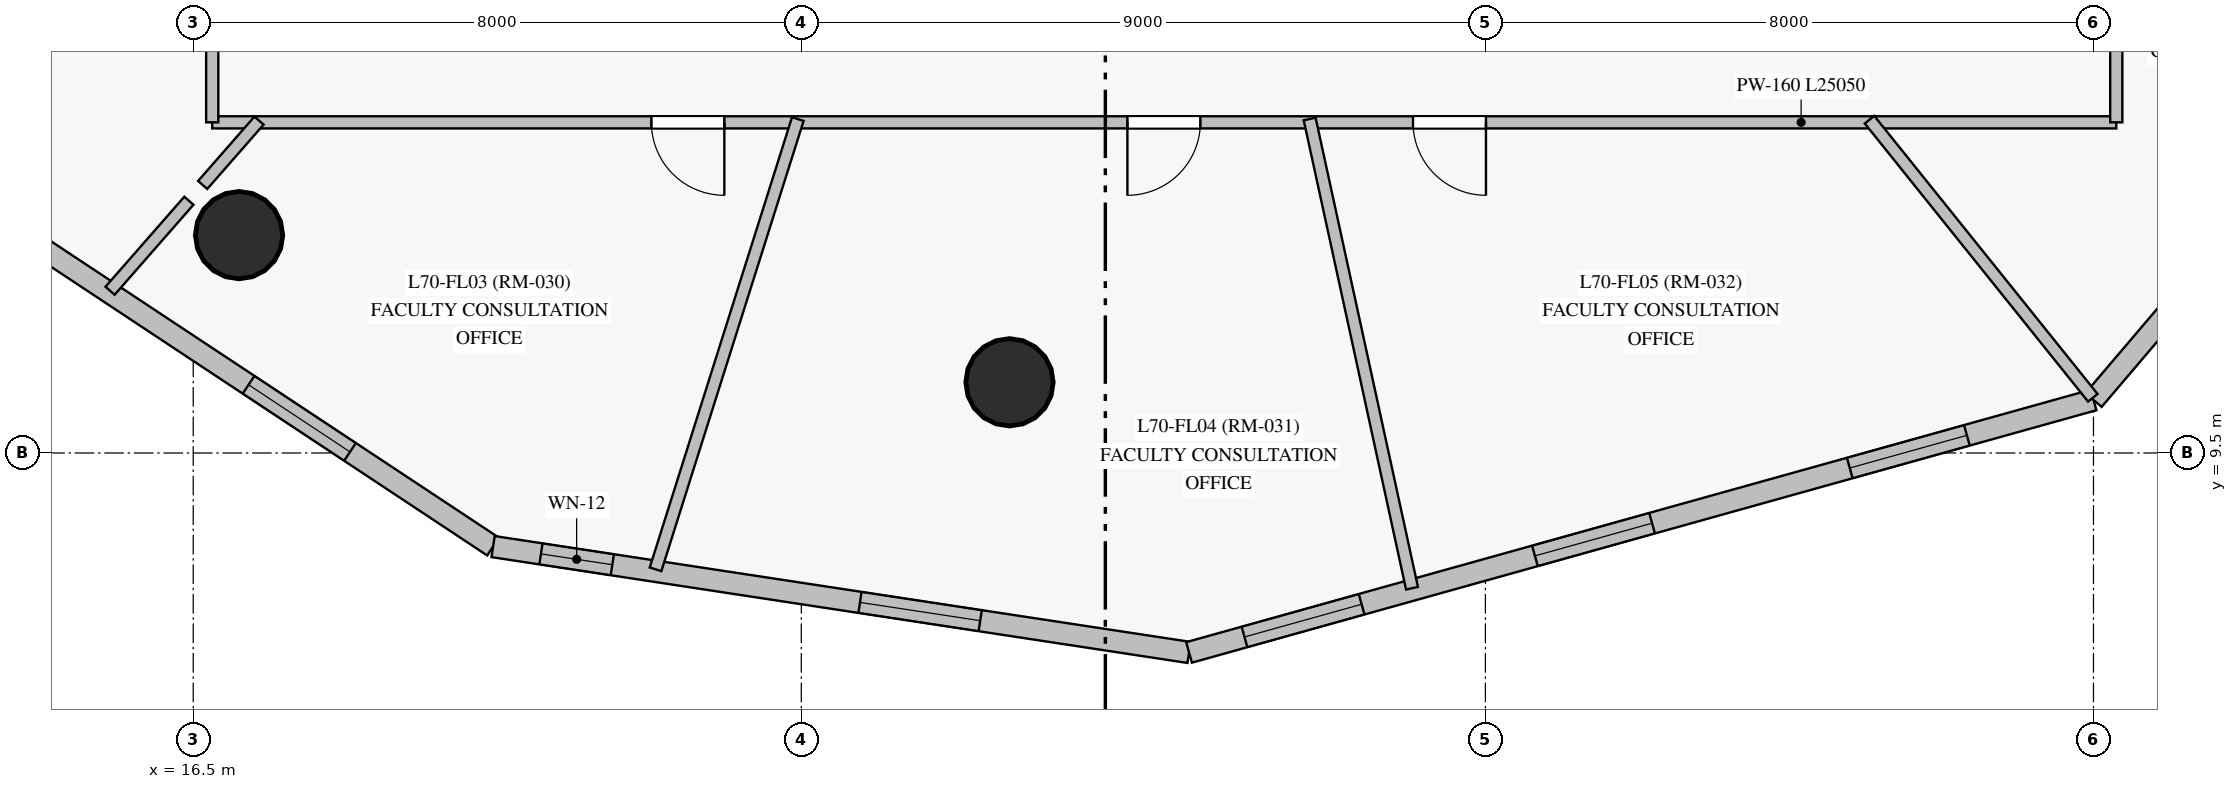
"""IFC4 building model, lengths in metres.
Left out: names, types, materials, properties, quantities, classifications, styles, units other than length and angle.
Written with IfcOpenShell. Run it as: python <this file> out.ifc"""

import sys

from ifc_helpers import new_model, si_unit, direction, frame, frame_2d, origin, origin_with_axes, origin_2d, place, context, subcontext, project, spatial, rectangle, circle, extrude, source, transform, mapped, element, fill, save


model = new_model("IFC4")
c1 = context("Model", 3, precision=1e-05, world=origin(), true_north=direction((0.0, 1.0)))
c2 = subcontext(c1, "Body", "Model", "MODEL_VIEW")
j1 = project(units=[si_unit("LENGTHUNIT", "METRE"), si_unit("PLANEANGLEUNIT", "RADIAN")], contexts=[c1])
p1 = place(None, origin())
s1 = spatial("IfcSite", under=j1, at=p1, CompositionType="ELEMENT")
p2 = place(p1, origin())
s2 = spatial("IfcBuilding", under=s1, at=p2, CompositionType="ELEMENT")
p3 = place(p2, frame((0.0, 0.0, 238.25)))
s3 = spatial("IfcBuildingStorey", under=s2, at=p3, CompositionType="ELEMENT", Elevation=238.25)
m1 = source(origin_with_axes(), c2, "Body", "SweptSolid", [
    extrude(circle(Radius=0.575, at=origin_2d()), origin(), (0.0, 0.0, 1.0), 3.05),
])
for number, where, z_axis, x_axis in (
    (1, (17.103, 12.366, 0.0), (0.0, 0.0, 1.0), (1.0, 0.0, 0.0)),
    (2, (27.239, 10.43, 0.0), (0.0, 0.0, 1.0), (1.0, 0.0, 0.0)),
):
    element("IfcColumn", number, at=place(p3, frame(where, z_axis=z_axis, x_axis=x_axis)), inside=s3, PredefinedType="COLUMN", context=c2, shape_type="MappedRepresentation", body=[
        mapped(m1, transform((0.0, 0.0, 0.0), scale=1.0)),
    ])
p4 = place(p3, frame((10.379, 14.93, 0.0), z_axis=(0.0, 0.0, 1.0), x_axis=(0.83391564232, -0.551891929179, 0.0)))
e3 = element("IfcWall", 3, at=p4, inside=s3, PredefinedType="SOLIDWALL", context=c2, shape_type="SweptSolid", body=[
    extrude(rectangle(XDim=12.071, YDim=0.28, at=frame_2d((6.036, 0.0))), origin(), (0.0, 0.0, 1.0), 2.85),
])
p5 = place(p4, frame((2.238, 0.0, 0.85)))
e4 = element("IfcOpeningElement", 4, at=p5, cuts=e3, PredefinedType="OPENING", context=c2, shape_type="SweptSolid", body=[
    extrude(rectangle(XDim=1.6, YDim=1.6, at=frame_2d((0.8, 0.8))), frame((0.0, 0.15, 0.0), z_axis=(0.0, -1.0, 0.0), x_axis=(1.0, 0.0, 0.0)), (0.0, 0.0, 1.0), 0.3),
])
p6 = place(p4, frame((8.213, 0.0, 0.85)))
e5 = element("IfcOpeningElement", 5, at=p6, cuts=e3, PredefinedType="OPENING", context=c2, shape_type="SweptSolid", body=[
    extrude(rectangle(XDim=1.6, YDim=1.6, at=frame_2d((0.8, 0.8))), frame((0.0, 0.15, 0.0), z_axis=(0.0, -1.0, 0.0), x_axis=(1.0, 0.0, 0.0)), (0.0, 0.0, 1.0), 0.3),
])
p7 = place(p3, frame((20.445, 8.269, 0.0), z_axis=(0.0, 0.0, 1.0), x_axis=(0.98863442974, -0.150339496915, 0.0)))
e6 = element("IfcWall", 6, at=p7, inside=s3, PredefinedType="SOLIDWALL", context=c2, shape_type="SweptSolid", body=[
    extrude(rectangle(XDim=9.261, YDim=0.28, at=frame_2d((4.631, 0.0))), origin(), (0.0, 0.0, 1.0), 2.85),
])
p8 = place(p7, frame((0.637, 0.0, 0.85)))
e7 = element("IfcOpeningElement", 7, at=p8, cuts=e6, PredefinedType="OPENING", context=c2, shape_type="SweptSolid", body=[
    extrude(rectangle(XDim=0.95, YDim=1.5, at=frame_2d((0.475, 0.75))), frame((0.0, 0.15, 0.0), z_axis=(0.0, -1.0, 0.0), x_axis=(1.0, 0.0, 0.0)), (0.0, 0.0, 1.0), 0.3),
])
p9 = place(p7, frame((4.882, 0.0, 0.85)))
e8 = element("IfcOpeningElement", 8, at=p9, cuts=e6, PredefinedType="OPENING", context=c2, shape_type="SweptSolid", body=[
    extrude(rectangle(XDim=1.6, YDim=1.6, at=frame_2d((0.8, 0.8))), frame((0.0, 0.15, 0.0), z_axis=(0.0, -1.0, 0.0), x_axis=(1.0, 0.0, 0.0)), (0.0, 0.0, 1.0), 0.3),
])
p10 = place(p3, frame((29.601, 6.876, 0.0), z_axis=(0.0, 0.0, 1.0), x_axis=(0.963188210112, 0.268827959673, 0.0)))
e9 = element("IfcWall", 9, at=p10, inside=s3, PredefinedType="SOLIDWALL", context=c2, shape_type="SweptSolid", body=[
    extrude(rectangle(XDim=12.355, YDim=0.28, at=frame_2d((6.177, 0.0))), origin(), (0.0, 0.0, 1.0), 2.85),
])
p11 = place(p10, frame((0.757, 0.0, 0.85)))
e10 = element("IfcOpeningElement", 10, at=p11, cuts=e9, PredefinedType="OPENING", context=c2, shape_type="SweptSolid", body=[
    extrude(rectangle(XDim=1.6, YDim=1.6, at=frame_2d((0.8, 0.8))), frame((0.0, 0.15, 0.0), z_axis=(0.0, -1.0, 0.0), x_axis=(1.0, 0.0, 0.0)), (0.0, 0.0, 1.0), 0.3),
])
p12 = place(p10, frame((4.725, 0.0, 0.85)))
e11 = element("IfcOpeningElement", 11, at=p12, cuts=e9, PredefinedType="OPENING", context=c2, shape_type="SweptSolid", body=[
    extrude(rectangle(XDim=1.6, YDim=1.6, at=frame_2d((0.8, 0.8))), frame((0.0, 0.15, 0.0), z_axis=(0.0, -1.0, 0.0), x_axis=(1.0, 0.0, 0.0)), (0.0, 0.0, 1.0), 0.3),
])
p13 = place(p10, frame((9.025, 0.0, 0.85)))
e12 = element("IfcOpeningElement", 12, at=p13, cuts=e9, PredefinedType="OPENING", context=c2, shape_type="SweptSolid", body=[
    extrude(rectangle(XDim=1.6, YDim=1.6, at=frame_2d((0.8, 0.8))), frame((0.0, 0.15, 0.0), z_axis=(0.0, -1.0, 0.0), x_axis=(1.0, 0.0, 0.0)), (0.0, 0.0, 1.0), 0.3),
])
p14 = place(p3, frame((41.501, 10.198, 0.0), z_axis=(0.0, 0.0, 1.0), x_axis=(0.648021806958, 0.761621781271, 0.0)))
e13 = element("IfcWall", 13, at=p14, inside=s3, PredefinedType="SOLIDWALL", context=c2, shape_type="SweptSolid", body=[
    extrude(rectangle(XDim=9.241, YDim=0.28, at=frame_2d((4.621, 0.0))), origin(), (0.0, 0.0, 1.0), 2.85),
])
p15 = place(p14, frame((2.962, 0.0, 0.85)))
e14 = element("IfcOpeningElement", 14, at=p15, cuts=e13, PredefinedType="OPENING", context=c2, shape_type="SweptSolid", body=[
    extrude(rectangle(XDim=1.6, YDim=1.6, at=frame_2d((0.8, 0.8))), frame((0.0, 0.15, 0.0), z_axis=(0.0, -1.0, 0.0), x_axis=(1.0, 0.0, 0.0)), (0.0, 0.0, 1.0), 0.3),
])
p16 = place(p3, frame((41.8, 13.85, 0.0), z_axis=(0.0, 0.0, 1.0), x_axis=(-1.0, 0.0, 0.0)))
e15 = element("IfcWall", 15, at=p16, inside=s3, PredefinedType="PARTITIONING", context=c2, shape_type="SweptSolid", body=[
    extrude(rectangle(XDim=25.05, YDim=0.16, at=frame_2d((12.525, 0.0))), origin(), (0.0, 0.0, 1.0), 2.3),
])
p17 = place(p16, frame((18.312, 0.0, 0.0)))
e16 = element("IfcOpeningElement", 16, at=p17, cuts=e15, PredefinedType="OPENING", context=c2, shape_type="SweptSolid", body=[
    extrude(rectangle(XDim=0.96, YDim=2.15, at=frame_2d((0.48, 1.075))), frame((0.0, 0.09, 0.0), z_axis=(0.0, -1.0, 0.0), x_axis=(1.0, 0.0, 0.0)), (0.0, 0.0, 1.0), 0.18),
])
p18 = place(p16, frame((12.05, 0.0, 0.0)))
e17 = element("IfcOpeningElement", 17, at=p18, cuts=e15, PredefinedType="OPENING", context=c2, shape_type="SweptSolid", body=[
    extrude(rectangle(XDim=0.96, YDim=2.15, at=frame_2d((0.48, 1.075))), frame((0.0, 0.09, 0.0), z_axis=(0.0, -1.0, 0.0), x_axis=(1.0, 0.0, 0.0)), (0.0, 0.0, 1.0), 0.18),
])
p19 = place(p16, frame((8.292, 0.0, 0.0)))
e18 = element("IfcOpeningElement", 18, at=p19, cuts=e15, PredefinedType="OPENING", context=c2, shape_type="SweptSolid", body=[
    extrude(rectangle(XDim=0.96, YDim=2.15, at=frame_2d((0.48, 1.075))), frame((0.0, 0.09, 0.0), z_axis=(0.0, -1.0, 0.0), x_axis=(1.0, 0.0, 0.0)), (0.0, 0.0, 1.0), 0.18),
])
p20 = place(p3, frame((41.8, 33.45, 0.0), z_axis=(0.0, 0.0, 1.0), x_axis=(0.0, -1.0, 0.0)))
e19 = element("IfcWall", 19, at=p20, inside=s3, PredefinedType="PARTITIONING", context=c2, shape_type="SweptSolid", body=[
    extrude(rectangle(XDim=19.6, YDim=0.16, at=frame_2d((9.8, 0.0))), origin(), (0.0, 0.0, 1.0), 2.3),
])
p21 = place(p20, frame((15.586, 0.0, 0.0)))
e20 = element("IfcOpeningElement", 20, at=p21, cuts=e19, PredefinedType="OPENING", context=c2, shape_type="SweptSolid", body=[
    extrude(rectangle(XDim=0.96, YDim=2.15, at=frame_2d((0.48, 1.075))), frame((0.0, 0.09, 0.0), z_axis=(0.0, -1.0, 0.0), x_axis=(1.0, 0.0, 0.0)), (0.0, 0.0, 1.0), 0.18),
])
p22 = place(p20, frame((9.325, 0.0, 0.0)))
e21 = element("IfcOpeningElement", 21, at=p22, cuts=e19, PredefinedType="OPENING", context=c2, shape_type="SweptSolid", body=[
    extrude(rectangle(XDim=0.96, YDim=2.15, at=frame_2d((0.48, 1.075))), frame((0.0, 0.09, 0.0), z_axis=(0.0, -1.0, 0.0), x_axis=(1.0, 0.0, 0.0)), (0.0, 0.0, 1.0), 0.18),
])
p23 = place(p20, frame((6.385, 0.0, 0.0)))
e22 = element("IfcOpeningElement", 22, at=p23, cuts=e19, PredefinedType="OPENING", context=c2, shape_type="SweptSolid", body=[
    extrude(rectangle(XDim=0.96, YDim=2.15, at=frame_2d((0.48, 1.075))), frame((0.0, 0.09, 0.0), z_axis=(0.0, -1.0, 0.0), x_axis=(1.0, 0.0, 0.0)), (0.0, 0.0, 1.0), 0.18),
])
p24 = place(p3, frame((16.75, 13.85, 0.0), z_axis=(0.0, 0.0, 1.0), x_axis=(0.0, 1.0, 0.0)))
e23 = element("IfcWall", 23, at=p24, inside=s3, PredefinedType="PARTITIONING", context=c2, shape_type="SweptSolid", body=[
    extrude(rectangle(XDim=17.8, YDim=0.16, at=frame_2d((8.9, 0.0))), origin(), (0.0, 0.0, 1.0), 2.45),
])
p25 = place(p24, frame((16.164, 0.0, 0.0)))
e24 = element("IfcOpeningElement", 24, at=p25, cuts=e23, PredefinedType="OPENING", context=c2, shape_type="SweptSolid", body=[
    extrude(rectangle(XDim=0.96, YDim=2.15, at=frame_2d((0.48, 1.075))), frame((0.0, 0.09, 0.0), z_axis=(0.0, -1.0, 0.0), x_axis=(1.0, 0.0, 0.0)), (0.0, 0.0, 1.0), 0.18),
])
p26 = place(p24, frame((8.425, 0.0, 0.0)))
e25 = element("IfcOpeningElement", 25, at=p26, cuts=e23, PredefinedType="OPENING", context=c2, shape_type="SweptSolid", body=[
    extrude(rectangle(XDim=0.96, YDim=2.15, at=frame_2d((0.48, 1.075))), frame((0.0, 0.09, 0.0), z_axis=(0.0, -1.0, 0.0), x_axis=(1.0, 0.0, 0.0)), (0.0, 0.0, 1.0), 0.18),
])
p27 = place(p24, frame((5.755, 0.0, 0.0)))
e26 = element("IfcOpeningElement", 26, at=p27, cuts=e23, PredefinedType="OPENING", context=c2, shape_type="SweptSolid", body=[
    extrude(rectangle(XDim=0.96, YDim=2.15, at=frame_2d((0.48, 1.075))), frame((0.0, 0.09, 0.0), z_axis=(0.0, -1.0, 0.0), x_axis=(1.0, 0.0, 0.0)), (0.0, 0.0, 1.0), 0.18),
])
p28 = place(p3, frame((31.188, 13.894, 0.0), z_axis=(0.0, 0.0, 1.0), x_axis=(0.213095319567, -0.977031414428, 0.0)))
e27 = element("IfcWall", 27, at=p28, inside=s3, PredefinedType="PARTITIONING", context=c2, shape_type="SweptSolid", body=[
    extrude(rectangle(XDim=6.318, YDim=0.16, at=frame_2d((3.159, 0.0))), origin(), (0.0, 0.0, 1.0), 2.85),
])
p29 = place(p3, frame((24.454, 13.893, 0.0), z_axis=(0.0, 0.0, 1.0), x_axis=(-0.301249865611, -0.953545236719, 0.0)))
e28 = element("IfcWall", 28, at=p29, inside=s3, PredefinedType="PARTITIONING", context=c2, shape_type="SweptSolid", body=[
    extrude(rectangle(XDim=6.212, YDim=0.16, at=frame_2d((3.106, 0.0))), origin(), (0.0, 0.0, 1.0), 2.85),
])
p30 = place(p3, frame((38.553, 13.885, 0.0), z_axis=(0.0, 0.0, 1.0), x_axis=(0.626159620149, -0.779694895517, 0.0)))
e29 = element("IfcWall", 29, at=p30, inside=s3, PredefinedType="PARTITIONING", context=c2, shape_type="SweptSolid", body=[
    extrude(rectangle(XDim=4.692, YDim=0.16, at=frame_2d((2.346, 0.0))), origin(), (0.0, 0.0, 1.0), 2.85),
])
p31 = place(p3, frame((16.443, 12.819, 0.0), z_axis=(0.0, 0.0, 1.0), x_axis=(-0.65872414358, -0.752384544409, 0.0)))
e30 = element("IfcWall", 30, at=p31, inside=s3, PredefinedType="PARTITIONING", context=c2, shape_type="SweptSolid", body=[
    extrude(rectangle(XDim=1.574, YDim=0.16, at=frame_2d((0.787, 0.0))), origin(), (0.0, 0.0, 1.0), 2.85),
])
p32 = place(p3, frame((17.365, 13.873, 0.0), z_axis=(0.0, 0.0, 1.0), x_axis=(-0.658688907656, -0.75241539254, 0.0)))
e31 = element("IfcWall", 31, at=p32, inside=s3, PredefinedType="PARTITIONING", context=c2, shape_type="SweptSolid", body=[
    extrude(rectangle(XDim=1.125, YDim=0.16, at=frame_2d((0.562, 0.0))), origin(), (0.0, 0.0, 1.0), 2.35),
])
m2 = source(origin_with_axes(), c2, "Body", "SweptSolid", [
    extrude(rectangle(XDim=1.6, YDim=1.6, at=frame_2d((0.8, 0.8))), frame((0.0, 0.03, 0.0), z_axis=(0.0, -1.0, 0.0), x_axis=(1.0, 0.0, 0.0)), (0.0, 0.0, 1.0), 0.06),
])
p33 = place(p6, origin())
e32 = element("IfcWindow", 32, at=p33, inside=s3, PartitioningType="SINGLE_PANEL", PredefinedType="WINDOW", context=c2, shape_type="MappedRepresentation", body=[
    mapped(m2, transform((0.0, 0.0, 0.0), scale=1.0)),
])
fill(e5, e32)
m3 = source(origin_with_axes(), c2, "Body", "SweptSolid", [
    extrude(rectangle(XDim=0.95, YDim=1.5, at=frame_2d((0.475, 0.75))), frame((0.0, 0.03, 0.0), z_axis=(0.0, -1.0, 0.0), x_axis=(1.0, 0.0, 0.0)), (0.0, 0.0, 1.0), 0.06),
])
p34 = place(p8, origin())
e33 = element("IfcWindow", 33, at=p34, inside=s3, PartitioningType="SINGLE_PANEL", PredefinedType="WINDOW", context=c2, shape_type="MappedRepresentation", body=[
    mapped(m3, transform((0.0, 0.0, 0.0), scale=1.0)),
])
fill(e7, e33)
p35 = place(p9, origin())
e34 = element("IfcWindow", 34, at=p35, inside=s3, PartitioningType="SINGLE_PANEL", PredefinedType="WINDOW", context=c2, shape_type="MappedRepresentation", body=[
    mapped(m2, transform((0.0, 0.0, 0.0), scale=1.0)),
])
fill(e8, e34)
p36 = place(p11, origin())
e35 = element("IfcWindow", 35, at=p36, inside=s3, PartitioningType="SINGLE_PANEL", PredefinedType="WINDOW", context=c2, shape_type="MappedRepresentation", body=[
    mapped(m2, transform((0.0, 0.0, 0.0), scale=1.0)),
])
fill(e10, e35)
p37 = place(p12, origin())
e36 = element("IfcWindow", 36, at=p37, inside=s3, PartitioningType="SINGLE_PANEL", PredefinedType="WINDOW", context=c2, shape_type="MappedRepresentation", body=[
    mapped(m2, transform((0.0, 0.0, 0.0), scale=1.0)),
])
fill(e11, e36)
p38 = place(p13, origin())
e37 = element("IfcWindow", 37, at=p38, inside=s3, PartitioningType="SINGLE_PANEL", PredefinedType="WINDOW", context=c2, shape_type="MappedRepresentation", body=[
    mapped(m2, transform((0.0, 0.0, 0.0), scale=1.0)),
])
fill(e12, e37)
m4 = source(origin_with_axes(), c2, "Body", "SweptSolid", [
    extrude(rectangle(XDim=0.96, YDim=2.15, at=frame_2d((0.48, 1.075))), frame((0.0, 0.025, 0.0), z_axis=(0.0, -1.0, 0.0), x_axis=(1.0, 0.0, 0.0)), (0.0, 0.0, 1.0), 0.05),
])
p39 = place(p17, origin())
e38 = element("IfcDoor", 38, at=p39, inside=s3, OperationType="SINGLE_SWING_LEFT", PredefinedType="DOOR", context=c2, shape_type="MappedRepresentation", body=[
    mapped(m4, transform((0.0, 0.0, 0.0), scale=1.0)),
])
fill(e16, e38)
p40 = place(p18, origin())
e39 = element("IfcDoor", 39, at=p40, inside=s3, OperationType="SINGLE_SWING_RIGHT", PredefinedType="DOOR", context=c2, shape_type="MappedRepresentation", body=[
    mapped(m4, transform((0.0, 0.0, 0.0), scale=1.0)),
])
fill(e17, e39)
p41 = place(p19, origin())
e40 = element("IfcDoor", 40, at=p41, inside=s3, OperationType="SINGLE_SWING_LEFT", PredefinedType="DOOR", context=c2, shape_type="MappedRepresentation", body=[
    mapped(m4, transform((0.0, 0.0, 0.0), scale=1.0)),
])
fill(e18, e40)
save(model, sys.argv[1])
